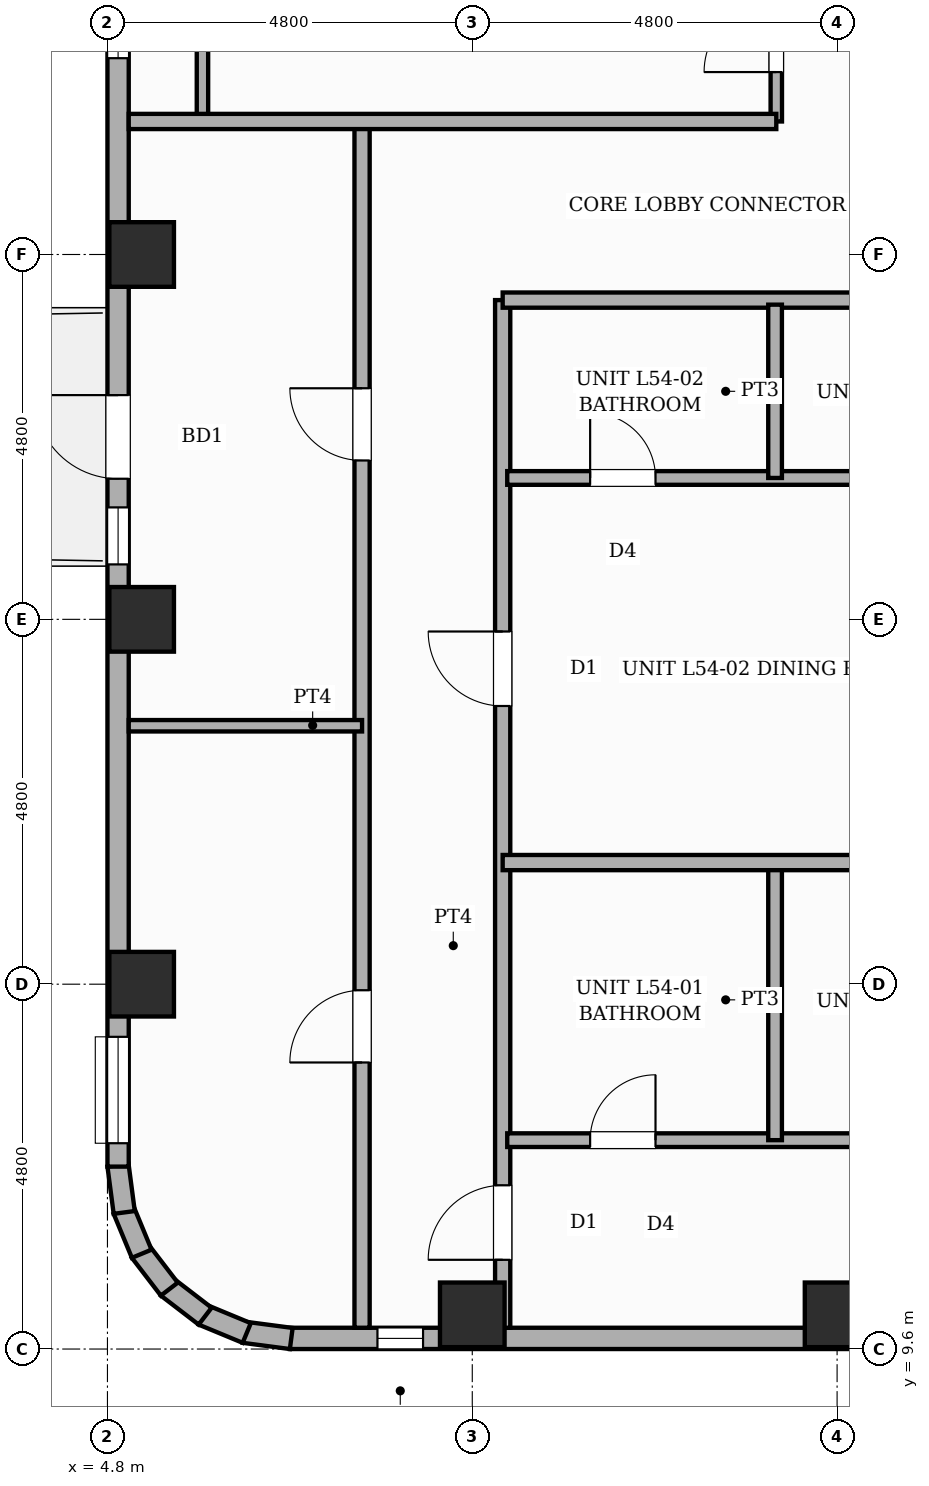
"""IFC4 building model, lengths in metres.
Left out: names, types, materials, properties, quantities, classifications, styles, units other than length and angle.
Written with IfcOpenShell. Run it as: python <this file> out.ifc"""

import sys

from ifc_helpers import new_model, si_unit, direction, frame, frame_2d, origin, origin_2d, place, context, subcontext, project, spatial, rectangle, extrude, element, fill, save


model = new_model("IFC4")
c1 = context("Model", 3, precision=1e-05, world=origin(), true_north=direction((0.0, 1.0)))
c2 = subcontext(c1, "Body", "Model", "MODEL_VIEW")
j1 = project(units=[si_unit("LENGTHUNIT", "METRE"), si_unit("PLANEANGLEUNIT", "RADIAN")], contexts=[c1])
p1 = place(None, origin())
s1 = spatial("IfcSite", under=j1, at=p1, CompositionType="ELEMENT")
p2 = place(p1, origin())
s2 = spatial("IfcBuilding", under=s1, at=p2, CompositionType="ELEMENT")
p3 = place(p2, frame((0.0, 0.0, 207.4)))
s3 = spatial("IfcBuildingStorey", under=s2, at=p3, CompositionType="ELEMENT", Elevation=207.4)
for number, where, z_axis, x_axis in (
    (1, (5.25, 14.4, 0.0), (0.0, 0.0, 1.0), (1.0, 0.0, 0.0)),
    (2, (5.25, 19.2, 0.0), (0.0, 0.0, 1.0), (1.0, 0.0, 0.0)),
    (3, (5.25, 24.0, 0.0), (0.0, 0.0, 1.0), (1.0, 0.0, 0.0)),
    (4, (9.6, 10.05, 0.0), (0.0, 0.0, 1.0), (1.0, 0.0, 0.0)),
    (5, (14.4, 10.05, 0.0), (0.0, 0.0, 1.0), (1.0, 0.0, 0.0)),
):
    element("IfcColumn", number, at=place(p3, frame(where, z_axis=z_axis, x_axis=x_axis)), inside=s3, PredefinedType="COLUMN", context=c2, shape_type="SweptSolid", body=[
        extrude(rectangle(XDim=0.85, YDim=0.85, at=origin_2d()), origin(), (0.0, 0.0, 1.0), 3.6),
    ])
p4 = place(p3, frame((21.6, 9.74, 0.0), z_axis=(0.0, 0.0, 1.0), x_axis=(-1.0, 0.0, 0.0)))
e6 = element("IfcWall", 6, at=p4, inside=s3, PredefinedType="STANDARD", context=c2, shape_type="SweptSolid", body=[
    extrude(rectangle(XDim=14.4, YDim=0.28, at=frame_2d((7.2, 0.0))), origin(), (0.0, 0.0, 1.0), 2.66),
])
p5 = place(p4, frame((12.647, 0.0, 0.45)))
e7 = element("IfcOpeningElement", 7, at=p5, cuts=e6, PredefinedType="OPENING", context=c2, shape_type="SweptSolid", body=[
    extrude(rectangle(XDim=0.6, YDim=1.8, at=frame_2d((0.3, 0.9))), frame((0.0, 0.15, 0.0), z_axis=(0.0, -1.0, 0.0), x_axis=(1.0, 0.0, 0.0)), (0.0, 0.0, 1.0), 0.3),
])
p6 = place(p4, frame((5.513, 0.0, 0.45)))
e8 = element("IfcOpeningElement", 8, at=p6, cuts=e6, PredefinedType="OPENING", context=c2, shape_type="SweptSolid", body=[
    extrude(rectangle(XDim=0.95, YDim=1.8, at=frame_2d((0.475, 0.9))), frame((0.0, 0.15, 0.0), z_axis=(0.0, -1.0, 0.0), x_axis=(1.0, 0.0, 0.0)), (0.0, 0.0, 1.0), 0.3),
])
p7 = place(p4, frame((0.308, 0.0, 0.65)))
e9 = element("IfcOpeningElement", 9, at=p7, cuts=e6, PredefinedType="OPENING", context=c2, shape_type="SweptSolid", body=[
    extrude(rectangle(XDim=1.4, YDim=1.1, at=frame_2d((0.7, 0.55))), frame((0.0, 0.15, 0.0), z_axis=(0.0, -1.0, 0.0), x_axis=(1.0, 0.0, 0.0)), (0.0, 0.0, 1.0), 0.3),
])
p8 = place(p3, frame((7.218, 9.739, 0.0), z_axis=(0.0, 0.0, 1.0), x_axis=(-0.9914410257, 0.130555323746, 0.0)))
e10 = element("IfcWall", 10, at=p8, inside=s3, PredefinedType="STANDARD", context=c2, shape_type="SweptSolid", body=[
    extrude(rectangle(XDim=0.626, YDim=0.28, at=frame_2d((0.313, 0.0))), origin(), (0.0, 0.0, 1.0), 3.38),
])
p9 = place(p3, frame((6.632, 9.811, 0.0), z_axis=(0.0, 0.0, 1.0), x_axis=(-0.923836271867, 0.382787856107, 0.0)))
e11 = element("IfcWall", 11, at=p9, inside=s3, PredefinedType="STANDARD", context=c2, shape_type="SweptSolid", body=[
    extrude(rectangle(XDim=0.626, YDim=0.28, at=frame_2d((0.313, 0.0))), origin(), (0.0, 0.0, 1.0), 3.38),
])
for number, where, z_axis, x_axis in (
    (12, (6.085, 10.033, 0.0), (0.0, 0.0, 1.0), (-0.793, 0.609, 0.0)),
    (13, (5.614, 10.388, 0.0), (0.0, 0.0, 1.0), (-0.609, 0.793, 0.0)),
    (14, (5.251, 10.854, 0.0), (0.0, 0.0, 1.0), (-0.383, 0.924, 0.0)),
    (15, (5.021, 11.397, 0.0), (0.0, 0.0, 1.0), (-0.131, 0.991, 0.0)),
):
    element("IfcWall", number, at=place(p3, frame(where, z_axis=z_axis, x_axis=x_axis)), inside=s3, PredefinedType="STANDARD", context=c2, shape_type="SweptSolid", body=[
        extrude(rectangle(XDim=0.626, YDim=0.28, at=frame_2d((0.313, 0.0))), origin(), (0.0, 0.0, 1.0), 3.38),
    ])
p10 = place(p3, frame((4.94, 12.0, 0.0), z_axis=(0.0, 0.0, 1.0), x_axis=(0.0, 1.0, 0.0)))
e16 = element("IfcWall", 16, at=p10, inside=s3, PredefinedType="STANDARD", context=c2, shape_type="SweptSolid", body=[
    extrude(rectangle(XDim=33.6, YDim=0.28, at=frame_2d((16.8, 0.0))), origin(), (0.0, 0.0, 1.0), 2.66),
])
p11 = place(p10, frame((9.05, 0.0, 0.0)))
e17 = element("IfcOpeningElement", 17, at=p11, cuts=e16, PredefinedType="OPENING", context=c2, shape_type="SweptSolid", body=[
    extrude(rectangle(XDim=1.1, YDim=2.15, at=frame_2d((0.55, 1.075))), frame((0.0, 0.15, 0.0), z_axis=(0.0, -1.0, 0.0), x_axis=(1.0, 0.0, 0.0)), (0.0, 0.0, 1.0), 0.3),
])
p12 = place(p10, frame((14.583, 0.0, 0.65)))
e18 = element("IfcOpeningElement", 18, at=p12, cuts=e16, PredefinedType="OPENING", context=c2, shape_type="SweptSolid", body=[
    extrude(rectangle(XDim=1.4, YDim=1.1, at=frame_2d((0.7, 0.55))), frame((0.0, 0.15, 0.0), z_axis=(0.0, -1.0, 0.0), x_axis=(1.0, 0.0, 0.0)), (0.0, 0.0, 1.0), 0.3),
])
p13 = place(p10, frame((0.308, 0.0, 0.65)))
e19 = element("IfcOpeningElement", 19, at=p13, cuts=e16, PredefinedType="OPENING", context=c2, shape_type="SweptSolid", body=[
    extrude(rectangle(XDim=1.4, YDim=1.1, at=frame_2d((0.7, 0.55))), frame((0.0, 0.15, 0.0), z_axis=(0.0, -1.0, 0.0), x_axis=(1.0, 0.0, 0.0)), (0.0, 0.0, 1.0), 0.3),
])
p14 = place(p10, frame((7.923, 0.0, 0.45)))
e20 = element("IfcOpeningElement", 20, at=p14, cuts=e16, PredefinedType="OPENING", context=c2, shape_type="SweptSolid", body=[
    extrude(rectangle(XDim=0.75, YDim=1.8, at=frame_2d((0.375, 0.9))), frame((0.0, 0.15, 0.0), z_axis=(0.0, -1.0, 0.0), x_axis=(1.0, 0.0, 0.0)), (0.0, 0.0, 1.0), 0.3),
])
p15 = place(p3, frame((13.6, 25.75, 0.0), z_axis=(0.0, 0.0, 1.0), x_axis=(0.0, 1.0, 0.0)))
e21 = element("IfcWall", 21, at=p15, inside=s3, PredefinedType="PARTITIONING", context=c2, shape_type="SweptSolid", body=[
    extrude(rectangle(XDim=5.15, YDim=0.15, at=frame_2d((2.575, 0.0))), origin(), (0.0, 0.0, 1.0), 3.38),
])
p16 = place(p15, frame((0.65, 0.0, 0.0)))
e22 = element("IfcOpeningElement", 22, at=p16, cuts=e21, PredefinedType="OPENING", context=c2, shape_type="SweptSolid", body=[
    extrude(rectangle(XDim=0.95, YDim=2.15, at=frame_2d((0.475, 1.075))), frame((0.0, 0.085, 0.0), z_axis=(0.0, -1.0, 0.0), x_axis=(1.0, 0.0, 0.0)), (0.0, 0.0, 1.0), 0.17),
])
p17 = place(p15, frame((3.1, 0.0, 0.0)))
e23 = element("IfcOpeningElement", 23, at=p17, cuts=e21, PredefinedType="OPENING", context=c2, shape_type="SweptSolid", body=[
    extrude(rectangle(XDim=0.95, YDim=2.15, at=frame_2d((0.475, 1.075))), frame((0.0, 0.085, 0.0), z_axis=(0.0, -1.0, 0.0), x_axis=(1.0, 0.0, 0.0)), (0.0, 0.0, 1.0), 0.17),
])
p18 = place(p3, frame((6.05, 25.75, 0.0), z_axis=(0.0, 0.0, 1.0), x_axis=(0.0, 1.0, 0.0)))
e24 = element("IfcWall", 24, at=p18, inside=s3, PredefinedType="PARTITIONING", context=c2, shape_type="SweptSolid", body=[
    extrude(rectangle(XDim=5.15, YDim=0.15, at=frame_2d((2.575, 0.0))), origin(), (0.0, 0.0, 1.0), 3.38),
])
p19 = place(p3, frame((8.15, 9.88, 0.0), z_axis=(0.0, 0.0, 1.0), x_axis=(0.0, 1.0, 0.0)))
e25 = element("IfcWall", 25, at=p19, inside=s3, PredefinedType="PARTITIONING", context=c2, shape_type="SweptSolid", body=[
    extrude(rectangle(XDim=15.87, YDim=0.2, at=frame_2d((7.935, 0.0))), origin(), (0.0, 0.0, 1.0), 3.38),
])
p20 = place(p19, frame((3.49, 0.0, 0.0)))
e26 = element("IfcOpeningElement", 26, at=p20, cuts=e25, PredefinedType="OPENING", context=c2, shape_type="SweptSolid", body=[
    extrude(rectangle(XDim=0.95, YDim=2.15, at=frame_2d((0.475, 1.075))), frame((0.0, 0.11, 0.0), z_axis=(0.0, -1.0, 0.0), x_axis=(1.0, 0.0, 0.0)), (0.0, 0.0, 1.0), 0.22),
])
p21 = place(p19, frame((11.41, 0.0, 0.0)))
e27 = element("IfcOpeningElement", 27, at=p21, cuts=e25, PredefinedType="OPENING", context=c2, shape_type="SweptSolid", body=[
    extrude(rectangle(XDim=0.95, YDim=2.15, at=frame_2d((0.475, 1.075))), frame((0.0, 0.11, 0.0), z_axis=(0.0, -1.0, 0.0), x_axis=(1.0, 0.0, 0.0)), (0.0, 0.0, 1.0), 0.22),
])
p22 = place(p3, frame((10.0, 9.88, 0.0), z_axis=(0.0, 0.0, 1.0), x_axis=(0.0, 1.0, 0.0)))
e28 = element("IfcWall", 28, at=p22, inside=s3, PredefinedType="PARTITIONING", context=c2, shape_type="SweptSolid", body=[
    extrude(rectangle(XDim=13.52, YDim=0.2, at=frame_2d((6.76, 0.0))), origin(), (0.0, 0.0, 1.0), 3.38),
])
p23 = place(p22, frame((0.894, 0.0, 0.0)))
e29 = element("IfcOpeningElement", 29, at=p23, cuts=e28, PredefinedType="OPENING", context=c2, shape_type="SweptSolid", body=[
    extrude(rectangle(XDim=0.98, YDim=2.18, at=frame_2d((0.49, 1.09))), frame((0.0, 0.11, 0.0), z_axis=(0.0, -1.0, 0.0), x_axis=(1.0, 0.0, 0.0)), (0.0, 0.0, 1.0), 0.22),
])
p24 = place(p22, frame((8.18, 0.0, 0.0)))
e30 = element("IfcOpeningElement", 30, at=p24, cuts=e28, PredefinedType="OPENING", context=c2, shape_type="SweptSolid", body=[
    extrude(rectangle(XDim=0.98, YDim=2.18, at=frame_2d((0.49, 1.09))), frame((0.0, 0.11, 0.0), z_axis=(0.0, -1.0, 0.0), x_axis=(1.0, 0.0, 0.0)), (0.0, 0.0, 1.0), 0.22),
])
p25 = place(p3, frame((10.0, 23.4, 0.0), z_axis=(0.0, 0.0, 1.0), x_axis=(1.0, 0.0, 0.0)))
e31 = element("IfcWall", 31, at=p25, inside=s3, PredefinedType="PARTITIONING", context=c2, shape_type="SweptSolid", body=[
    extrude(rectangle(XDim=13.72, YDim=0.2, at=frame_2d((6.86, 0.0))), origin(), (0.0, 0.0, 1.0), 3.38),
])
p26 = place(p3, frame((5.08, 25.75, 0.0), z_axis=(0.0, 0.0, 1.0), x_axis=(1.0, 0.0, 0.0)))
e32 = element("IfcWall", 32, at=p26, inside=s3, PredefinedType="PARTITIONING", context=c2, shape_type="SweptSolid", body=[
    extrude(rectangle(XDim=8.52, YDim=0.2, at=frame_2d((4.26, 0.0))), origin(), (0.0, 0.0, 1.0), 3.38),
])
p27 = place(p3, frame((5.08, 17.8, 0.0), z_axis=(0.0, 0.0, 1.0), x_axis=(1.0, 0.0, 0.0)))
e33 = element("IfcWall", 33, at=p27, inside=s3, PredefinedType="PARTITIONING", context=c2, shape_type="SweptSolid", body=[
    extrude(rectangle(XDim=3.07, YDim=0.15, at=frame_2d((1.535, 0.0))), origin(), (0.0, 0.0, 1.0), 3.38),
])
p28 = place(p3, frame((10.06, 12.348, 0.0), z_axis=(0.0, 0.0, 1.0), x_axis=(1.0, 0.0, 0.0)))
e34 = element("IfcWall", 34, at=p28, inside=s3, PredefinedType="PLUMBINGWALL", context=c2, shape_type="SweptSolid", body=[
    extrude(rectangle(XDim=13.66, YDim=0.18, at=frame_2d((6.83, 0.0))), origin(), (0.0, 0.0, 1.0), 3.38),
])
p29 = place(p28, frame((1.091, 0.0, 0.0)))
e35 = element("IfcOpeningElement", 35, at=p29, cuts=e34, PredefinedType="OPENING", context=c2, shape_type="SweptSolid", body=[
    extrude(rectangle(XDim=0.86, YDim=2.1, at=frame_2d((0.43, 1.05))), frame((0.0, 0.1, 0.0), z_axis=(0.0, -1.0, 0.0), x_axis=(1.0, 0.0, 0.0)), (0.0, 0.0, 1.0), 0.2),
])
p30 = place(p28, frame((4.868, 0.0, 0.0)))
e36 = element("IfcOpeningElement", 36, at=p30, cuts=e34, PredefinedType="OPENING", context=c2, shape_type="SweptSolid", body=[
    extrude(rectangle(XDim=0.9, YDim=2.15, at=frame_2d((0.45, 1.075))), frame((0.0, 0.1, 0.0), z_axis=(0.0, -1.0, 0.0), x_axis=(1.0, 0.0, 0.0)), (0.0, 0.0, 1.0), 0.2),
])
p31 = place(p28, frame((9.897, 0.0, 0.0)))
e37 = element("IfcOpeningElement", 37, at=p31, cuts=e34, PredefinedType="OPENING", context=c2, shape_type="SweptSolid", body=[
    extrude(rectangle(XDim=0.9, YDim=2.15, at=frame_2d((0.45, 1.075))), frame((0.0, 0.1, 0.0), z_axis=(0.0, -1.0, 0.0), x_axis=(1.0, 0.0, 0.0)), (0.0, 0.0, 1.0), 0.2),
])
p32 = place(p3, frame((13.584, 12.348, 0.0), z_axis=(0.0, 0.0, 1.0), x_axis=(0.0, 1.0, 0.0)))
e38 = element("IfcWall", 38, at=p32, inside=s3, PredefinedType="PLUMBINGWALL", context=c2, shape_type="SweptSolid", body=[
    extrude(rectangle(XDim=3.692, YDim=0.18, at=frame_2d((1.846, 0.0))), origin(), (0.0, 0.0, 1.0), 3.38),
])
p33 = place(p3, frame((10.0, 16.0, 0.0), z_axis=(0.0, 0.0, 1.0), x_axis=(1.0, 0.0, 0.0)))
e39 = element("IfcWall", 39, at=p33, inside=s3, PredefinedType="SOLIDWALL", context=c2, shape_type="SweptSolid", body=[
    extrude(rectangle(XDim=13.72, YDim=0.2, at=frame_2d((6.86, 0.0))), origin(), (0.0, 0.0, 1.0), 3.38),
])
p34 = place(p3, frame((10.06, 21.06, 0.0), z_axis=(0.0, 0.0, 1.0), x_axis=(1.0, 0.0, 0.0)))
e40 = element("IfcWall", 40, at=p34, inside=s3, PredefinedType="PLUMBINGWALL", context=c2, shape_type="SweptSolid", body=[
    extrude(rectangle(XDim=13.66, YDim=0.18, at=frame_2d((6.83, 0.0))), origin(), (0.0, 0.0, 1.0), 3.38),
])
p35 = place(p34, frame((1.091, 0.0, 0.0)))
e41 = element("IfcOpeningElement", 41, at=p35, cuts=e40, PredefinedType="OPENING", context=c2, shape_type="SweptSolid", body=[
    extrude(rectangle(XDim=0.86, YDim=2.1, at=frame_2d((0.43, 1.05))), frame((0.0, 0.1, 0.0), z_axis=(0.0, -1.0, 0.0), x_axis=(1.0, 0.0, 0.0)), (0.0, 0.0, 1.0), 0.2),
])
p36 = place(p34, frame((4.868, 0.0, 0.0)))
e42 = element("IfcOpeningElement", 42, at=p36, cuts=e40, PredefinedType="OPENING", context=c2, shape_type="SweptSolid", body=[
    extrude(rectangle(XDim=0.9, YDim=2.15, at=frame_2d((0.45, 1.075))), frame((0.0, 0.1, 0.0), z_axis=(0.0, -1.0, 0.0), x_axis=(1.0, 0.0, 0.0)), (0.0, 0.0, 1.0), 0.2),
])
p37 = place(p34, frame((9.897, 0.0, 0.0)))
e43 = element("IfcOpeningElement", 43, at=p37, cuts=e40, PredefinedType="OPENING", context=c2, shape_type="SweptSolid", body=[
    extrude(rectangle(XDim=0.9, YDim=2.15, at=frame_2d((0.45, 1.075))), frame((0.0, 0.1, 0.0), z_axis=(0.0, -1.0, 0.0), x_axis=(1.0, 0.0, 0.0)), (0.0, 0.0, 1.0), 0.2),
])
p38 = place(p3, frame((13.584, 21.06, 0.0), z_axis=(0.0, 0.0, 1.0), x_axis=(0.0, 1.0, 0.0)))
e44 = element("IfcWall", 44, at=p38, inside=s3, PredefinedType="PLUMBINGWALL", context=c2, shape_type="SweptSolid", body=[
    extrude(rectangle(XDim=2.28, YDim=0.18, at=frame_2d((1.14, 0.0))), origin(), (0.0, 0.0, 1.0), 3.38),
])
p39 = place(p5, origin())
e45 = element("IfcWindow", 45, at=p39, inside=s3, PartitioningType="SINGLE_PANEL", PredefinedType="WINDOW", context=c2, shape_type="SweptSolid", body=[
    extrude(rectangle(XDim=0.6, YDim=1.8, at=frame_2d((0.3, 0.9))), frame((0.0, 0.03, 0.0), z_axis=(0.0, -1.0, 0.0), x_axis=(1.0, 0.0, 0.0)), (0.0, 0.0, 1.0), 0.06),
])
fill(e7, e45)
p40 = place(p11, origin())
e46 = element("IfcDoor", 46, at=p40, inside=s3, OperationType="SINGLE_SWING_RIGHT", PredefinedType="DOOR", context=c2, shape_type="SweptSolid", body=[
    extrude(rectangle(XDim=1.1, YDim=2.15, at=frame_2d((0.55, 1.075))), frame((0.0, 0.025, 0.0), z_axis=(0.0, -1.0, 0.0), x_axis=(1.0, 0.0, 0.0)), (0.0, 0.0, 1.0), 0.05),
])
fill(e17, e46)
p41 = place(p12, origin())
e47 = element("IfcWindow", 47, at=p41, inside=s3, PartitioningType="SINGLE_PANEL", PredefinedType="WINDOW", context=c2, shape_type="SweptSolid", body=[
    extrude(rectangle(XDim=1.4, YDim=1.1, at=frame_2d((0.7, 0.55))), frame((0.0, 0.03, 0.0), z_axis=(0.0, -1.0, 0.0), x_axis=(1.0, 0.0, 0.0)), (0.0, 0.0, 1.0), 0.06),
])
fill(e18, e47)
p42 = place(p13, origin())
e48 = element("IfcWindow", 48, at=p42, inside=s3, PartitioningType="SINGLE_PANEL", PredefinedType="WINDOW", context=c2, shape_type="SweptSolid", body=[
    extrude(rectangle(XDim=1.4, YDim=1.1, at=frame_2d((0.7, 0.55))), frame((0.0, 0.03, 0.0), z_axis=(0.0, -1.0, 0.0), x_axis=(1.0, 0.0, 0.0)), (0.0, 0.0, 1.0), 0.06),
])
fill(e19, e48)
p43 = place(p14, origin())
e49 = element("IfcWindow", 49, at=p43, inside=s3, PartitioningType="SINGLE_PANEL", PredefinedType="WINDOW", context=c2, shape_type="SweptSolid", body=[
    extrude(rectangle(XDim=0.75, YDim=1.8, at=frame_2d((0.375, 0.9))), frame((0.0, 0.03, 0.0), z_axis=(0.0, -1.0, 0.0), x_axis=(1.0, 0.0, 0.0)), (0.0, 0.0, 1.0), 0.06),
])
fill(e20, e49)
p44 = place(p16, origin())
e50 = element("IfcDoor", 50, at=p44, inside=s3, OperationType="SINGLE_SWING_LEFT", PredefinedType="DOOR", context=c2, shape_type="SweptSolid", body=[
    extrude(rectangle(XDim=0.95, YDim=2.15, at=frame_2d((0.475, 1.075))), frame((0.0, 0.025, 0.0), z_axis=(0.0, -1.0, 0.0), x_axis=(1.0, 0.0, 0.0)), (0.0, 0.0, 1.0), 0.05),
])
fill(e22, e50)
p45 = place(p20, origin())
e51 = element("IfcDoor", 51, at=p45, inside=s3, OperationType="SINGLE_SWING_LEFT", PredefinedType="DOOR", context=c2, shape_type="SweptSolid", body=[
    extrude(rectangle(XDim=0.95, YDim=2.15, at=frame_2d((0.475, 1.075))), frame((0.0, 0.025, 0.0), z_axis=(0.0, -1.0, 0.0), x_axis=(1.0, 0.0, 0.0)), (0.0, 0.0, 1.0), 0.05),
])
fill(e26, e51)
p46 = place(p21, origin())
e52 = element("IfcDoor", 52, at=p46, inside=s3, OperationType="SINGLE_SWING_RIGHT", PredefinedType="DOOR", context=c2, shape_type="SweptSolid", body=[
    extrude(rectangle(XDim=0.95, YDim=2.15, at=frame_2d((0.475, 1.075))), frame((0.0, 0.025, 0.0), z_axis=(0.0, -1.0, 0.0), x_axis=(1.0, 0.0, 0.0)), (0.0, 0.0, 1.0), 0.05),
])
fill(e27, e52)
p47 = place(p23, origin())
e53 = element("IfcDoor", 53, at=p47, inside=s3, OperationType="SINGLE_SWING_LEFT", PredefinedType="DOOR", context=c2, shape_type="SweptSolid", body=[
    extrude(rectangle(XDim=0.98, YDim=2.18, at=frame_2d((0.49, 1.09))), frame((0.0, 0.025, 0.0), z_axis=(0.0, -1.0, 0.0), x_axis=(1.0, 0.0, 0.0)), (0.0, 0.0, 1.0), 0.05),
])
fill(e29, e53)
p48 = place(p29, origin())
e54 = element("IfcDoor", 54, at=p48, inside=s3, OperationType="SINGLE_SWING_RIGHT", PredefinedType="DOOR", context=c2, shape_type="SweptSolid", body=[
    extrude(rectangle(XDim=0.86, YDim=2.1, at=frame_2d((0.43, 1.05))), frame((0.0, 0.025, 0.0), z_axis=(0.0, -1.0, 0.0), x_axis=(1.0, 0.0, 0.0)), (0.0, 0.0, 1.0), 0.05),
])
fill(e35, e54)
p49 = place(p24, origin())
e55 = element("IfcDoor", 55, at=p49, inside=s3, OperationType="SINGLE_SWING_RIGHT", PredefinedType="DOOR", context=c2, shape_type="SweptSolid", body=[
    extrude(rectangle(XDim=0.98, YDim=2.18, at=frame_2d((0.49, 1.09))), frame((0.0, 0.025, 0.0), z_axis=(0.0, -1.0, 0.0), x_axis=(1.0, 0.0, 0.0)), (0.0, 0.0, 1.0), 0.05),
])
fill(e30, e55)
p50 = place(p35, origin())
e56 = element("IfcDoor", 56, at=p50, inside=s3, OperationType="SINGLE_SWING_LEFT", PredefinedType="DOOR", context=c2, shape_type="SweptSolid", body=[
    extrude(rectangle(XDim=0.86, YDim=2.1, at=frame_2d((0.43, 1.05))), frame((0.0, 0.025, 0.0), z_axis=(0.0, -1.0, 0.0), x_axis=(1.0, 0.0, 0.0)), (0.0, 0.0, 1.0), 0.05),
])
fill(e41, e56)
save(model, sys.argv[1])
